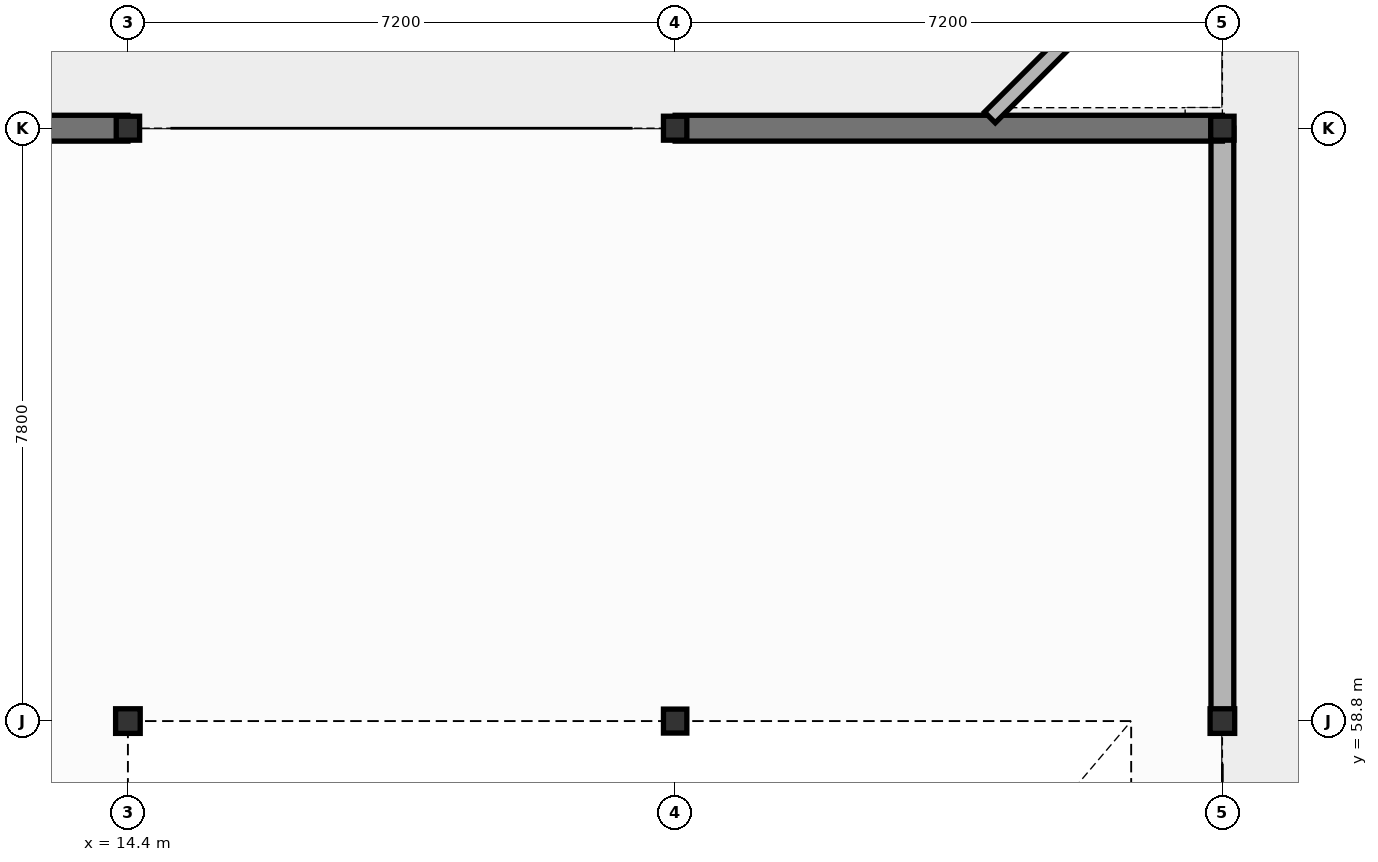
"""IFC4 building model, lengths in metres.
Left out: names, types, materials, properties, quantities, classifications, styles, units other than length and angle.
Written with IfcOpenShell. Run it as: python <this file> out.ifc"""

import sys

from ifc_helpers import new_model, si_unit, direction, frame, frame_2d, origin, origin_2d, place, context, subcontext, project, spatial, rectangle, hollow_circle, i_section, extrude, element, fill, save


model = new_model("IFC4")
c1 = context("Model", 3, precision=1e-05, world=origin(), true_north=direction((0.0, 1.0)))
c2 = subcontext(c1, "Body", "Model", "MODEL_VIEW")
j1 = project(units=[si_unit("LENGTHUNIT", "METRE"), si_unit("PLANEANGLEUNIT", "RADIAN")], contexts=[c1])
p1 = place(None, origin())
s1 = spatial("IfcSite", under=j1, at=p1, CompositionType="ELEMENT")
p2 = place(p1, origin())
s2 = spatial("IfcBuilding", under=s1, at=p2, CompositionType="ELEMENT")
p3 = place(p2, frame((0.0, 0.0, 12.78)))
s3 = spatial("IfcBuildingStorey", under=s2, at=p3, CompositionType="ELEMENT", Elevation=12.78)
p4 = place(p3, frame((14.4, 58.8, 0.0), z_axis=(0.0, 0.0, 1.0), x_axis=(1.0, 0.0, 0.0)))
e1 = element("IfcColumn", 1, at=p4, inside=s3, PredefinedType="COLUMN", context=c2, shape_type="SweptSolid", body=[
    extrude(hollow_circle(Radius=0.162, WallThickness=0.012, at=origin_2d()), origin(), (0.0, 0.0, 1.0), 3.74),
])
for number, where, z_axis, x_axis in (
    (2, (14.4, 66.6, 0.0), (0.0, 0.0, 1.0), (1.0, 0.0, 0.0)),
    (3, (21.6, 58.8, 0.0), (0.0, 0.0, 1.0), (1.0, 0.0, 0.0)),
    (4, (21.6, 66.6, 0.0), (0.0, 0.0, 1.0), (1.0, 0.0, 0.0)),
):
    element("IfcColumn", number, at=place(p3, frame(where, z_axis=z_axis, x_axis=x_axis)), inside=s3, PredefinedType="COLUMN", context=c2, shape_type="SweptSolid", body=[
        extrude(i_section(OverallWidth=0.307, OverallDepth=0.315, WebThickness=0.012, FlangeThickness=0.019, at=origin_2d()), origin(), (0.0, 0.0, 1.0), 3.74),
    ])
p5 = place(p3, frame((28.8, 58.8, 0.0), z_axis=(0.0, 0.0, 1.0), x_axis=(1.0, 0.0, 0.0)))
e5 = element("IfcColumn", 5, at=p5, inside=s3, PredefinedType="COLUMN", context=c2, shape_type="SweptSolid", body=[
    extrude(hollow_circle(Radius=0.162, WallThickness=0.012, at=origin_2d()), origin(), (0.0, 0.0, 1.0), 3.74),
])
p6 = place(p3, frame((28.8, 66.6, 0.0), z_axis=(0.0, 0.0, 1.0), x_axis=(1.0, 0.0, 0.0)))
e6 = element("IfcColumn", 6, at=p6, inside=s3, PredefinedType="COLUMN", context=c2, shape_type="SweptSolid", body=[
    extrude(i_section(OverallWidth=0.307, OverallDepth=0.315, WebThickness=0.012, FlangeThickness=0.019, at=origin_2d()), origin(), (0.0, 0.0, 1.0), 3.74),
])
p7 = place(p3, frame((28.8, 58.8, 0.0), z_axis=(0.0, 0.0, 1.0), x_axis=(0.0, 1.0, 0.0)))
e7 = element("IfcWall", 7, at=p7, inside=s3, PredefinedType="SOLIDWALL", context=c2, shape_type="SweptSolid", body=[
    extrude(rectangle(XDim=7.8, YDim=0.3, at=frame_2d((3.9, 0.0))), origin(), (0.0, 0.0, 1.0), 2.873),
])
p8 = place(p7, frame((1.6, 0.0, 0.653)))
e8 = element("IfcOpeningElement", 8, at=p8, cuts=e7, PredefinedType="OPENING", context=c2, shape_type="SweptSolid", body=[
    extrude(rectangle(XDim=1.95, YDim=2.1, at=frame_2d((0.975, 1.05))), frame((0.0, 0.16, 0.0), z_axis=(0.0, -1.0, 0.0), x_axis=(1.0, 0.0, 0.0)), (0.0, 0.0, 1.0), 0.32),
])
p9 = place(p7, frame((4.5, 0.0, 0.703)))
e9 = element("IfcOpeningElement", 9, at=p9, cuts=e7, PredefinedType="OPENING", context=c2, shape_type="SweptSolid", body=[
    extrude(rectangle(XDim=1.6, YDim=2.05, at=frame_2d((0.8, 1.025))), frame((0.0, 0.16, 0.0), z_axis=(0.0, -1.0, 0.0), x_axis=(1.0, 0.0, 0.0)), (0.0, 0.0, 1.0), 0.32),
])
p10 = place(p3, frame((7.2, 66.6, 0.0), z_axis=(0.0, 0.0, 1.0), x_axis=(1.0, 0.0, 0.0)))
e10 = element("IfcWall", 10, at=p10, inside=s3, PredefinedType="SOLIDWALL", context=c2, shape_type="SweptSolid", body=[
    extrude(rectangle(XDim=7.2, YDim=0.34, at=frame_2d((3.6, 0.0))), origin(), (0.0, 0.0, 1.0), 3.42),
])
p11 = place(p10, frame((4.4, 0.0, 0.9)))
e11 = element("IfcOpeningElement", 11, at=p11, cuts=e10, PredefinedType="OPENING", context=c2, shape_type="SweptSolid", body=[
    extrude(rectangle(XDim=1.75, YDim=2.15, at=frame_2d((0.875, 1.075))), frame((0.0, 0.18, 0.0), z_axis=(0.0, -1.0, 0.0), x_axis=(1.0, 0.0, 0.0)), (0.0, 0.0, 1.0), 0.36),
])
p12 = place(p3, frame((21.6, 66.6, 0.0), z_axis=(0.0, 0.0, 1.0), x_axis=(1.0, 0.0, 0.0)))
e12 = element("IfcWall", 12, at=p12, inside=s3, PredefinedType="SOLIDWALL", context=c2, shape_type="SweptSolid", body=[
    extrude(rectangle(XDim=7.2, YDim=0.34, at=frame_2d((3.6, 0.0))), origin(), (0.0, 0.0, 1.0), 3.42),
])
p13 = place(p12, frame((2.2, 0.0, 0.683)))
e13 = element("IfcOpeningElement", 13, at=p13, cuts=e12, PredefinedType="OPENING", context=c2, shape_type="SweptSolid", body=[
    extrude(rectangle(XDim=1.75, YDim=2.15, at=frame_2d((0.875, 1.075))), frame((0.0, 0.18, 0.0), z_axis=(0.0, -1.0, 0.0), x_axis=(1.0, 0.0, 0.0)), (0.0, 0.0, 1.0), 0.36),
])
p14 = place(p3, frame((25.741, 66.741, 0.0), z_axis=(0.0, 0.0, 1.0), x_axis=(0.707106781187, 0.707106781187, 0.0)))
e14 = element("IfcWall", 14, at=p14, inside=s3, PredefinedType="PARAPET", context=c2, shape_type="SweptSolid", body=[
    extrude(rectangle(XDim=4.125, YDim=0.2, at=frame_2d((2.063, 0.0))), origin(), (0.0, 0.0, 1.0), 0.72),
])
p15 = place(p8, origin())
e15 = element("IfcWindow", 15, at=p15, inside=s3, PartitioningType="SINGLE_PANEL", PredefinedType="WINDOW", context=c2, shape_type="SweptSolid", body=[
    extrude(rectangle(XDim=1.95, YDim=2.1, at=frame_2d((0.975, 1.05))), frame((0.0, 0.03, 0.0), z_axis=(0.0, -1.0, 0.0), x_axis=(1.0, 0.0, 0.0)), (0.0, 0.0, 1.0), 0.06),
])
fill(e8, e15)
p16 = place(p9, origin())
e16 = element("IfcWindow", 16, at=p16, inside=s3, PartitioningType="SINGLE_PANEL", PredefinedType="WINDOW", context=c2, shape_type="SweptSolid", body=[
    extrude(rectangle(XDim=1.6, YDim=2.05, at=frame_2d((0.8, 1.025))), frame((0.0, 0.03, 0.0), z_axis=(0.0, -1.0, 0.0), x_axis=(1.0, 0.0, 0.0)), (0.0, 0.0, 1.0), 0.06),
])
fill(e9, e16)
p17 = place(p13, origin())
e17 = element("IfcWindow", 17, at=p17, inside=s3, PartitioningType="SINGLE_PANEL", PredefinedType="WINDOW", context=c2, shape_type="SweptSolid", body=[
    extrude(rectangle(XDim=1.75, YDim=2.15, at=frame_2d((0.875, 1.075))), frame((0.0, 0.03, 0.0), z_axis=(0.0, -1.0, 0.0), x_axis=(1.0, 0.0, 0.0)), (0.0, 0.0, 1.0), 0.06),
])
fill(e13, e17)
save(model, sys.argv[1])
